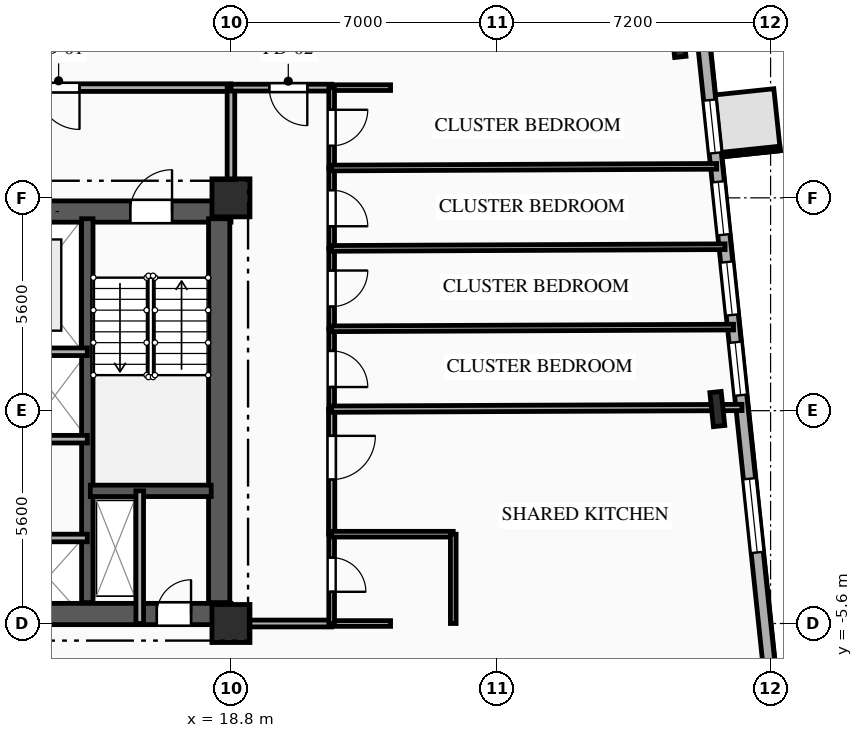
"""IFC4 building model, lengths in metres.
Left out: names, types, materials, properties, quantities, classifications, styles, units other than length and angle.
Written with IfcOpenShell. Run it as: python <this file> out.ifc"""

import sys

from ifc_helpers import new_model, si_unit, direction, frame, frame_2d, origin, origin_2d, place, context, subcontext, project, spatial, rectangle, i_section, extrude, element, fill, save


model = new_model("IFC4")
c1 = context("Model", 3, precision=1e-05, world=origin(), true_north=direction((0.0, 1.0)))
c2 = subcontext(c1, "Body", "Model", "MODEL_VIEW")
j1 = project(units=[si_unit("LENGTHUNIT", "METRE"), si_unit("PLANEANGLEUNIT", "RADIAN")], contexts=[c1])
p1 = place(None, origin())
s1 = spatial("IfcSite", under=j1, at=p1, CompositionType="ELEMENT")
p2 = place(p1, origin())
s2 = spatial("IfcBuilding", under=s1, at=p2, CompositionType="ELEMENT")
p3 = place(p2, frame((0.0, 0.0, 85.7)))
s3 = spatial("IfcBuildingStorey", under=s2, at=p3, CompositionType="ELEMENT", Elevation=85.7)
for number, where, z_axis, x_axis in (
    (1, (18.8, -5.6, 0.0), (0.0, 0.0, 1.0), (1.0, 0.0, 0.0)),
    (2, (18.8, 5.6, 0.0), (0.0, 0.0, 1.0), (1.0, 0.0, 0.0)),
):
    element("IfcColumn", number, at=place(p3, frame(where, z_axis=z_axis, x_axis=x_axis)), inside=s3, PredefinedType="COLUMN", context=c2, shape_type="SweptSolid", body=[
        extrude(rectangle(XDim=1.0, YDim=1.0, at=origin_2d()), origin(), (0.0, 0.0, 1.0), 3.35),
    ])
for number, where, z_axis, x_axis in (
    (3, (31.598, 0.043, 0.0), (0.0, 0.0, 1.0), (0.995, 0.105, 0.0)),
    (4, (30.577, 9.756, 0.0), (0.0, 0.0, 1.0), (0.995, 0.105, 0.0)),
):
    element("IfcColumn", number, at=place(p3, frame(where, z_axis=z_axis, x_axis=x_axis)), inside=s3, PredefinedType="COLUMN", context=c2, shape_type="SweptSolid", body=[
        extrude(i_section(OverallWidth=0.3, OverallDepth=0.9, WebThickness=0.019, FlangeThickness=0.035, FilletRadius=0.03, at=origin_2d()), origin(), (0.0, 0.0, 1.0), 3.35),
    ])
p4 = place(p3, frame((30.135, 20.183, 0.0), z_axis=(0.0, 0.0, 1.0), x_axis=(0.104525716865, -0.994522184023, 0.0)))
e5 = element("IfcWall", 5, at=p4, inside=s3, PredefinedType="SOLIDWALL", context=c2, shape_type="SweptSolid", body=[
    extrude(rectangle(XDim=30.6, YDim=0.32, at=frame_2d((15.3, 0.0))), origin(), (0.0, 0.0, 1.0), 3.045),
])
p5 = place(p4, frame((12.077, 0.0, 0.85)))
e6 = element("IfcOpeningElement", 6, at=p5, cuts=e5, PredefinedType="OPENING", context=c2, shape_type="SweptSolid", body=[
    extrude(rectangle(XDim=1.4, YDim=1.85, at=frame_2d((0.7, 0.925))), frame((0.0, 0.17, 0.0), z_axis=(0.0, -1.0, 0.0), x_axis=(1.0, 0.0, 0.0)), (0.0, 0.0, 1.0), 0.34),
])
p6 = place(p4, frame((14.24, 0.0, 0.85)))
e7 = element("IfcOpeningElement", 7, at=p6, cuts=e5, PredefinedType="OPENING", context=c2, shape_type="SweptSolid", body=[
    extrude(rectangle(XDim=1.4, YDim=1.85, at=frame_2d((0.7, 0.925))), frame((0.0, 0.17, 0.0), z_axis=(0.0, -1.0, 0.0), x_axis=(1.0, 0.0, 0.0)), (0.0, 0.0, 1.0), 0.34),
])
p7 = place(p4, frame((16.362, 0.0, 0.85)))
e8 = element("IfcOpeningElement", 8, at=p7, cuts=e5, PredefinedType="OPENING", context=c2, shape_type="SweptSolid", body=[
    extrude(rectangle(XDim=1.4, YDim=1.85, at=frame_2d((0.7, 0.925))), frame((0.0, 0.17, 0.0), z_axis=(0.0, -1.0, 0.0), x_axis=(1.0, 0.0, 0.0)), (0.0, 0.0, 1.0), 0.34),
])
p8 = place(p4, frame((18.485, 0.0, 0.85)))
e9 = element("IfcOpeningElement", 9, at=p8, cuts=e5, PredefinedType="OPENING", context=c2, shape_type="SweptSolid", body=[
    extrude(rectangle(XDim=1.4, YDim=1.85, at=frame_2d((0.7, 0.925))), frame((0.0, 0.17, 0.0), z_axis=(0.0, -1.0, 0.0), x_axis=(1.0, 0.0, 0.0)), (0.0, 0.0, 1.0), 0.34),
])
p9 = place(p4, frame((22.095, 0.0, 0.85)))
e10 = element("IfcOpeningElement", 10, at=p9, cuts=e5, PredefinedType="OPENING", context=c2, shape_type="SweptSolid", body=[
    extrude(rectangle(XDim=1.95, YDim=1.85, at=frame_2d((0.975, 0.925))), frame((0.0, 0.17, 0.0), z_axis=(0.0, -1.0, 0.0), x_axis=(1.0, 0.0, 0.0)), (0.0, 0.0, 1.0), 0.34),
])
p10 = place(p3, frame((9.2, 5.24, 0.0), z_axis=(0.0, 0.0, 1.0), x_axis=(1.0, 0.0, 0.0)))
e11 = element("IfcWall", 11, at=p10, inside=s3, PredefinedType="SHEAR", context=c2, shape_type="SweptSolid", body=[
    extrude(rectangle(XDim=9.6, YDim=0.56, at=frame_2d((4.8, 0.0))), origin(), (0.0, 0.0, 1.0), 3.045),
])
p11 = place(p10, frame((6.95, 0.0, 0.0)))
e12 = element("IfcOpeningElement", 12, at=p11, cuts=e11, PredefinedType="OPENING", context=c2, shape_type="SweptSolid", body=[
    extrude(rectangle(XDim=1.1, YDim=2.15, at=frame_2d((0.55, 1.075))), frame((0.0, 0.29, 0.0), z_axis=(0.0, -1.0, 0.0), x_axis=(1.0, 0.0, 0.0)), (0.0, 0.0, 1.0), 0.58),
])
p12 = place(p10, frame((3.775, 0.0, 0.0)))
e13 = element("IfcOpeningElement", 13, at=p12, cuts=e11, PredefinedType="OPENING", context=c2, shape_type="SweptSolid", body=[
    extrude(rectangle(XDim=1.05, YDim=2.1, at=frame_2d((0.525, 1.05))), frame((0.0, 0.29, 0.0), z_axis=(0.0, -1.0, 0.0), x_axis=(1.0, 0.0, 0.0)), (0.0, 0.0, 1.0), 0.58),
])
p13 = place(p3, frame((9.2, -5.35, 0.0), z_axis=(0.0, 0.0, 1.0), x_axis=(1.0, 0.0, 0.0)))
e14 = element("IfcWall", 14, at=p13, inside=s3, PredefinedType="SHEAR", context=c2, shape_type="SweptSolid", body=[
    extrude(rectangle(XDim=9.6, YDim=0.56, at=frame_2d((4.8, 0.0))), origin(), (0.0, 0.0, 1.0), 3.045),
])
p14 = place(p13, frame((7.65, 0.0, 0.0)))
e15 = element("IfcOpeningElement", 15, at=p14, cuts=e14, PredefinedType="OPENING", context=c2, shape_type="SweptSolid", body=[
    extrude(rectangle(XDim=0.9, YDim=2.1, at=frame_2d((0.45, 1.05))), frame((0.0, 0.29, 0.0), z_axis=(0.0, -1.0, 0.0), x_axis=(1.0, 0.0, 0.0)), (0.0, 0.0, 1.0), 0.58),
])
p15 = place(p3, frame((18.49, -5.05, 0.0), z_axis=(0.0, 0.0, 1.0), x_axis=(0.0, 1.0, 0.0)))
e16 = element("IfcWall", 16, at=p15, inside=s3, PredefinedType="SHEAR", context=c2, shape_type="SweptSolid", body=[
    extrude(rectangle(XDim=10.1, YDim=0.56, at=frame_2d((5.05, 0.0))), origin(), (0.0, 0.0, 1.0), 3.045),
])
p16 = place(p3, frame((15.02, -5.05, 0.0), z_axis=(0.0, 0.0, 1.0), x_axis=(0.0, 1.0, 0.0)))
e17 = element("IfcWall", 17, at=p16, inside=s3, PredefinedType="SHEAR", context=c2, shape_type="SweptSolid", body=[
    extrude(rectangle(XDim=10.1, YDim=0.3, at=frame_2d((5.05, 0.0))), origin(), (0.0, 0.0, 1.0), 3.045),
])
p17 = place(p3, frame((15.1, -2.11, 0.0), z_axis=(0.0, 0.0, 1.0), x_axis=(1.0, 0.0, 0.0)))
e18 = element("IfcWall", 18, at=p17, inside=s3, PredefinedType="SHEAR", context=c2, shape_type="SweptSolid", body=[
    extrude(rectangle(XDim=3.18, YDim=0.3, at=frame_2d((1.59, 0.0))), origin(), (0.0, 0.0, 1.0), 3.045),
])
p18 = place(p3, frame((16.4, -2.11, 0.0), z_axis=(0.0, 0.0, 1.0), x_axis=(0.0, -1.0, 0.0)))
e19 = element("IfcWall", 19, at=p18, inside=s3, PredefinedType="PARTITIONING", context=c2, shape_type="SweptSolid", body=[
    extrude(rectangle(XDim=3.49, YDim=0.2, at=frame_2d((1.745, 0.0))), origin(), (0.0, 0.0, 1.0), 3.045),
])
p19 = place(p3, frame((18.8, 8.5, 0.0), z_axis=(0.0, 0.0, 1.0), x_axis=(-1.0, 0.0, 0.0)))
e20 = element("IfcWall", 20, at=p19, inside=s3, PredefinedType="PARTITIONING", context=c2, shape_type="SweptSolid", body=[
    extrude(rectangle(XDim=6.8, YDim=0.2, at=frame_2d((3.4, 0.0))), origin(), (0.0, 0.0, 1.0), 3.045),
])
p20 = place(p19, frame((3.985, 0.0, 0.0)))
e21 = element("IfcOpeningElement", 21, at=p20, cuts=e20, PredefinedType="OPENING", context=c2, shape_type="SweptSolid", body=[
    extrude(rectangle(XDim=1.1, YDim=2.15, at=frame_2d((0.55, 1.075))), frame((0.0, 0.11, 0.0), z_axis=(0.0, -1.0, 0.0), x_axis=(1.0, 0.0, 0.0)), (0.0, 0.0, 1.0), 0.22),
])
p21 = place(p3, frame((18.8, 5.6, 0.0), z_axis=(0.0, 0.0, 1.0), x_axis=(0.0, 1.0, 0.0)))
e22 = element("IfcWall", 22, at=p21, inside=s3, PredefinedType="PARTITIONING", context=c2, shape_type="SweptSolid", body=[
    extrude(rectangle(XDim=2.9, YDim=0.2, at=frame_2d((1.45, 0.0))), origin(), (0.0, 0.0, 1.0), 2.53),
])
p22 = place(p3, frame((13.02, -3.35, 0.0), z_axis=(0.0, 0.0, 1.0), x_axis=(1.0, 0.0, 0.0)))
e23 = element("IfcWall", 23, at=p22, inside=s3, PredefinedType="PARTITIONING", context=c2, shape_type="SweptSolid", body=[
    extrude(rectangle(XDim=2.0, YDim=0.2, at=frame_2d((1.0, 0.0))), origin(), (0.0, 0.0, 1.0), 3.045),
])
p23 = place(p3, frame((15.02, -0.75, 0.0), z_axis=(0.0, 0.0, 1.0), x_axis=(-1.0, 0.0, 0.0)))
e24 = element("IfcWall", 24, at=p23, inside=s3, PredefinedType="PARTITIONING", context=c2, shape_type="SweptSolid", body=[
    extrude(rectangle(XDim=1.68, YDim=0.2, at=frame_2d((0.84, 0.0))), origin(), (0.0, 0.0, 1.0), 3.045),
])
p24 = place(p3, frame((21.45, 8.5, 0.0), z_axis=(0.0, 0.0, 1.0), x_axis=(-1.0, 0.0, 0.0)))
e25 = element("IfcWall", 25, at=p24, inside=s3, PredefinedType="PARTITIONING", context=c2, shape_type="SweptSolid", body=[
    extrude(rectangle(XDim=2.65, YDim=0.18, at=frame_2d((1.325, 0.0))), origin(), (0.0, 0.0, 1.0), 3.045),
])
p25 = place(p24, frame((0.641, 0.0, 0.0)))
e26 = element("IfcOpeningElement", 26, at=p25, cuts=e25, PredefinedType="OPENING", context=c2, shape_type="SweptSolid", body=[
    extrude(rectangle(XDim=1.0, YDim=2.15, at=frame_2d((0.5, 1.075))), frame((0.0, 0.1, 0.0), z_axis=(0.0, -1.0, 0.0), x_axis=(1.0, 0.0, 0.0)), (0.0, 0.0, 1.0), 0.2),
])
p26 = place(p3, frame((23.0, 8.5, 0.0), z_axis=(0.0, 0.0, 1.0), x_axis=(-1.0, 0.0, 0.0)))
e27 = element("IfcWall", 27, at=p26, inside=s3, PredefinedType="PARTITIONING", context=c2, shape_type="SweptSolid", body=[
    extrude(rectangle(XDim=1.55, YDim=0.15, at=frame_2d((0.775, 0.0))), origin(), (0.0, 0.0, 1.0), 3.045),
])
p27 = place(p3, frame((18.8, -5.6, 0.0), z_axis=(0.0, 0.0, 1.0), x_axis=(1.0, 0.0, 0.0)))
e28 = element("IfcWall", 28, at=p27, inside=s3, PredefinedType="PARTITIONING", context=c2, shape_type="SweptSolid", body=[
    extrude(rectangle(XDim=2.65, YDim=0.18, at=frame_2d((1.325, 0.0))), origin(), (0.0, 0.0, 1.0), 2.53),
])
p28 = place(p3, frame((21.45, -5.6, 0.0), z_axis=(0.0, 0.0, 1.0), x_axis=(1.0, 0.0, 0.0)))
e29 = element("IfcWall", 29, at=p28, inside=s3, PredefinedType="PLUMBINGWALL", context=c2, shape_type="SweptSolid", body=[
    extrude(rectangle(XDim=1.55, YDim=0.15, at=frame_2d((0.775, 0.0))), origin(), (0.0, 0.0, 1.0), 3.045),
])
p29 = place(p3, frame((21.45, -3.25, 0.0), z_axis=(0.0, 0.0, 1.0), x_axis=(0.0, -1.0, 0.0)))
e30 = element("IfcWall", 30, at=p29, inside=s3, PredefinedType="PLUMBINGWALL", context=c2, shape_type="SweptSolid", body=[
    extrude(rectangle(XDim=2.35, YDim=0.15, at=frame_2d((1.175, 0.0))), origin(), (0.0, 0.0, 1.0), 3.045),
])
p30 = place(p29, frame((0.616, 0.0, 0.0)))
e31 = element("IfcOpeningElement", 31, at=p30, cuts=e30, PredefinedType="OPENING", context=c2, shape_type="SweptSolid", body=[
    extrude(rectangle(XDim=0.9, YDim=2.1, at=frame_2d((0.45, 1.05))), frame((0.0, 0.085, 0.0), z_axis=(0.0, -1.0, 0.0), x_axis=(1.0, 0.0, 0.0)), (0.0, 0.0, 1.0), 0.17),
])
p31 = place(p3, frame((21.45, 0.04, 0.0), z_axis=(0.0, 0.0, 1.0), x_axis=(0.0, -1.0, 0.0)))
e32 = element("IfcWall", 32, at=p31, inside=s3, PredefinedType="PARTITIONING", context=c2, shape_type="SweptSolid", body=[
    extrude(rectangle(XDim=3.29, YDim=0.165, at=frame_2d((1.645, 0.0))), origin(), (0.0, 0.0, 1.0), 3.045),
])
p32 = place(p31, frame((0.702, 0.0, 0.0)))
e33 = element("IfcOpeningElement", 33, at=p32, cuts=e32, PredefinedType="OPENING", context=c2, shape_type="SweptSolid", body=[
    extrude(rectangle(XDim=1.15, YDim=2.15, at=frame_2d((0.575, 1.075))), frame((0.0, 0.093, 0.0), z_axis=(0.0, -1.0, 0.0), x_axis=(1.0, 0.0, 0.0)), (0.0, 0.0, 1.0), 0.185),
])
p33 = place(p3, frame((21.45, 2.155, 0.0), z_axis=(0.0, 0.0, 1.0), x_axis=(0.0, -1.0, 0.0)))
e34 = element("IfcWall", 34, at=p33, inside=s3, PredefinedType="PARTITIONING", context=c2, shape_type="SweptSolid", body=[
    extrude(rectangle(XDim=2.115, YDim=0.15, at=frame_2d((1.058, 0.0))), origin(), (0.0, 0.0, 1.0), 3.045),
])
p34 = place(p33, frame((0.583, 0.0, 0.0)))
e35 = element("IfcOpeningElement", 35, at=p34, cuts=e34, PredefinedType="OPENING", context=c2, shape_type="SweptSolid", body=[
    extrude(rectangle(XDim=0.95, YDim=2.1, at=frame_2d((0.475, 1.05))), frame((0.0, 0.085, 0.0), z_axis=(0.0, -1.0, 0.0), x_axis=(1.0, 0.0, 0.0)), (0.0, 0.0, 1.0), 0.17),
])
p35 = place(p3, frame((21.45, 4.27, 0.0), z_axis=(0.0, 0.0, 1.0), x_axis=(0.0, -1.0, 0.0)))
e36 = element("IfcWall", 36, at=p35, inside=s3, PredefinedType="PARTITIONING", context=c2, shape_type="SweptSolid", body=[
    extrude(rectangle(XDim=2.115, YDim=0.15, at=frame_2d((1.058, 0.0))), origin(), (0.0, 0.0, 1.0), 3.045),
])
p36 = place(p35, frame((0.583, 0.0, 0.0)))
e37 = element("IfcOpeningElement", 37, at=p36, cuts=e36, PredefinedType="OPENING", context=c2, shape_type="SweptSolid", body=[
    extrude(rectangle(XDim=0.95, YDim=2.1, at=frame_2d((0.475, 1.05))), frame((0.0, 0.085, 0.0), z_axis=(0.0, -1.0, 0.0), x_axis=(1.0, 0.0, 0.0)), (0.0, 0.0, 1.0), 0.17),
])
p37 = place(p3, frame((21.45, 6.385, 0.0), z_axis=(0.0, 0.0, 1.0), x_axis=(0.0, -1.0, 0.0)))
e38 = element("IfcWall", 38, at=p37, inside=s3, PredefinedType="PARTITIONING", context=c2, shape_type="SweptSolid", body=[
    extrude(rectangle(XDim=2.115, YDim=0.15, at=frame_2d((1.058, 0.0))), origin(), (0.0, 0.0, 1.0), 3.045),
])
p38 = place(p37, frame((0.583, 0.0, 0.0)))
e39 = element("IfcOpeningElement", 39, at=p38, cuts=e38, PredefinedType="OPENING", context=c2, shape_type="SweptSolid", body=[
    extrude(rectangle(XDim=0.95, YDim=2.1, at=frame_2d((0.475, 1.05))), frame((0.0, 0.085, 0.0), z_axis=(0.0, -1.0, 0.0), x_axis=(1.0, 0.0, 0.0)), (0.0, 0.0, 1.0), 0.17),
])
p39 = place(p3, frame((21.45, 8.5, 0.0), z_axis=(0.0, 0.0, 1.0), x_axis=(0.0, -1.0, 0.0)))
e40 = element("IfcWall", 40, at=p39, inside=s3, PredefinedType="PARTITIONING", context=c2, shape_type="SweptSolid", body=[
    extrude(rectangle(XDim=2.115, YDim=0.15, at=frame_2d((1.058, 0.0))), origin(), (0.0, 0.0, 1.0), 3.045),
])
p40 = place(p39, frame((0.583, 0.0, 0.0)))
e41 = element("IfcOpeningElement", 41, at=p40, cuts=e40, PredefinedType="OPENING", context=c2, shape_type="SweptSolid", body=[
    extrude(rectangle(XDim=0.95, YDim=2.1, at=frame_2d((0.475, 1.05))), frame((0.0, 0.085, 0.0), z_axis=(0.0, -1.0, 0.0), x_axis=(1.0, 0.0, 0.0)), (0.0, 0.0, 1.0), 0.17),
])
p41 = place(p3, frame((21.45, -3.25, 0.0), z_axis=(0.0, 0.0, 1.0), x_axis=(1.0, 0.0, 0.0)))
e42 = element("IfcWall", 42, at=p41, inside=s3, PredefinedType="PLUMBINGWALL", context=c2, shape_type="SweptSolid", body=[
    extrude(rectangle(XDim=3.2, YDim=0.15, at=frame_2d((1.6, 0.0))), origin(), (0.0, 0.0, 1.0), 3.045),
])
p42 = place(p3, frame((24.65, -3.25, 0.0), z_axis=(0.0, 0.0, 1.0), x_axis=(0.0, -1.0, 0.0)))
e43 = element("IfcWall", 43, at=p42, inside=s3, PredefinedType="PLUMBINGWALL", context=c2, shape_type="SweptSolid", body=[
    extrude(rectangle(XDim=2.35, YDim=0.15, at=frame_2d((1.175, 0.0))), origin(), (0.0, 0.0, 1.0), 3.045),
])
p43 = place(p3, frame((21.45, 0.04, 0.0), z_axis=(0.0, 0.0, 1.0), x_axis=(0.999991717636, 0.004069970361, 0.0)))
e44 = element("IfcWall", 44, at=p43, inside=s3, PredefinedType="PARTITIONING", context=c2, shape_type="SweptSolid", body=[
    extrude(rectangle(XDim=10.797, YDim=0.165, at=frame_2d((5.399, 0.0))), origin(), (0.0, 0.0, 1.0), 2.53),
])
p44 = place(p3, frame((21.45, 2.155, 0.0), z_axis=(0.0, 0.0, 1.0), x_axis=(0.999991365588, 0.004155568413, 0.0)))
e45 = element("IfcWall", 45, at=p44, inside=s3, PredefinedType="PARTITIONING", context=c2, shape_type="SweptSolid", body=[
    extrude(rectangle(XDim=10.575, YDim=0.15, at=frame_2d((5.288, 0.0))), origin(), (0.0, 0.0, 1.0), 3.045),
])
p45 = place(p3, frame((21.45, 4.27, 0.0), z_axis=(0.0, 0.0, 1.0), x_axis=(0.999990991033, 0.004244744214, 0.0)))
e46 = element("IfcWall", 46, at=p45, inside=s3, PredefinedType="PARTITIONING", context=c2, shape_type="SweptSolid", body=[
    extrude(rectangle(XDim=10.353, YDim=0.15, at=frame_2d((5.176, 0.0))), origin(), (0.0, 0.0, 1.0), 3.045),
])
p46 = place(p3, frame((21.45, 6.385, 0.0), z_axis=(0.0, 0.0, 1.0), x_axis=(0.999990591112, 0.004337935759, 0.0)))
e47 = element("IfcWall", 47, at=p46, inside=s3, PredefinedType="PARTITIONING", context=c2, shape_type="SweptSolid", body=[
    extrude(rectangle(XDim=10.13, YDim=0.15, at=frame_2d((5.065, 0.0))), origin(), (0.0, 0.0, 1.0), 3.045),
])
p47 = place(p3, frame((9.2, 1.55, 0.0), z_axis=(0.0, 0.0, 1.0), x_axis=(1.0, 0.0, 0.0)))
e48 = element("IfcWall", 48, at=p47, inside=s3, PredefinedType="PARTITIONING", context=c2, shape_type="SweptSolid", body=[
    extrude(rectangle(XDim=5.82, YDim=0.2, at=frame_2d((2.91, 0.0))), origin(), (0.0, 0.0, 1.0), 3.045),
])
p48 = place(p5, origin())
e49 = element("IfcWindow", 49, at=p48, inside=s3, PartitioningType="SINGLE_PANEL", PredefinedType="WINDOW", context=c2, shape_type="SweptSolid", body=[
    extrude(rectangle(XDim=1.4, YDim=1.85, at=frame_2d((0.7, 0.925))), frame((0.0, 0.03, 0.0), z_axis=(0.0, -1.0, 0.0), x_axis=(1.0, 0.0, 0.0)), (0.0, 0.0, 1.0), 0.06),
])
fill(e6, e49)
p49 = place(p6, origin())
e50 = element("IfcWindow", 50, at=p49, inside=s3, PartitioningType="SINGLE_PANEL", PredefinedType="WINDOW", context=c2, shape_type="SweptSolid", body=[
    extrude(rectangle(XDim=1.4, YDim=1.85, at=frame_2d((0.7, 0.925))), frame((0.0, 0.03, 0.0), z_axis=(0.0, -1.0, 0.0), x_axis=(1.0, 0.0, 0.0)), (0.0, 0.0, 1.0), 0.06),
])
fill(e7, e50)
p50 = place(p7, origin())
e51 = element("IfcWindow", 51, at=p50, inside=s3, PartitioningType="SINGLE_PANEL", PredefinedType="WINDOW", context=c2, shape_type="SweptSolid", body=[
    extrude(rectangle(XDim=1.4, YDim=1.85, at=frame_2d((0.7, 0.925))), frame((0.0, 0.03, 0.0), z_axis=(0.0, -1.0, 0.0), x_axis=(1.0, 0.0, 0.0)), (0.0, 0.0, 1.0), 0.06),
])
fill(e8, e51)
p51 = place(p8, origin())
e52 = element("IfcWindow", 52, at=p51, inside=s3, PartitioningType="SINGLE_PANEL", PredefinedType="WINDOW", context=c2, shape_type="SweptSolid", body=[
    extrude(rectangle(XDim=1.4, YDim=1.85, at=frame_2d((0.7, 0.925))), frame((0.0, 0.03, 0.0), z_axis=(0.0, -1.0, 0.0), x_axis=(1.0, 0.0, 0.0)), (0.0, 0.0, 1.0), 0.06),
])
fill(e9, e52)
p52 = place(p9, origin())
e53 = element("IfcWindow", 53, at=p52, inside=s3, PartitioningType="SINGLE_PANEL", PredefinedType="WINDOW", context=c2, shape_type="SweptSolid", body=[
    extrude(rectangle(XDim=1.95, YDim=1.85, at=frame_2d((0.975, 0.925))), frame((0.0, 0.03, 0.0), z_axis=(0.0, -1.0, 0.0), x_axis=(1.0, 0.0, 0.0)), (0.0, 0.0, 1.0), 0.06),
])
fill(e10, e53)
p53 = place(p11, origin())
e54 = element("IfcDoor", 54, at=p53, inside=s3, OperationType="SINGLE_SWING_RIGHT", PredefinedType="DOOR", context=c2, shape_type="SweptSolid", body=[
    extrude(rectangle(XDim=1.1, YDim=2.15, at=frame_2d((0.55, 1.075))), frame((0.0, 0.025, 0.0), z_axis=(0.0, -1.0, 0.0), x_axis=(1.0, 0.0, 0.0)), (0.0, 0.0, 1.0), 0.05),
])
fill(e12, e54)
p54 = place(p14, origin())
e55 = element("IfcDoor", 55, at=p54, inside=s3, OperationType="SINGLE_SWING_RIGHT", PredefinedType="DOOR", context=c2, shape_type="SweptSolid", body=[
    extrude(rectangle(XDim=0.9, YDim=2.1, at=frame_2d((0.45, 1.05))), frame((0.0, 0.025, 0.0), z_axis=(0.0, -1.0, 0.0), x_axis=(1.0, 0.0, 0.0)), (0.0, 0.0, 1.0), 0.05),
])
fill(e15, e55)
p55 = place(p20, origin())
e56 = element("IfcDoor", 56, at=p55, inside=s3, OperationType="SINGLE_SWING_LEFT", PredefinedType="DOOR", context=c2, shape_type="SweptSolid", body=[
    extrude(rectangle(XDim=1.1, YDim=2.15, at=frame_2d((0.55, 1.075))), frame((0.0, 0.025, 0.0), z_axis=(0.0, -1.0, 0.0), x_axis=(1.0, 0.0, 0.0)), (0.0, 0.0, 1.0), 0.05),
])
fill(e21, e56)
p56 = place(p25, origin())
e57 = element("IfcDoor", 57, at=p56, inside=s3, OperationType="SINGLE_SWING_LEFT", PredefinedType="DOOR", context=c2, shape_type="SweptSolid", body=[
    extrude(rectangle(XDim=1.0, YDim=2.15, at=frame_2d((0.5, 1.075))), frame((0.0, 0.025, 0.0), z_axis=(0.0, -1.0, 0.0), x_axis=(1.0, 0.0, 0.0)), (0.0, 0.0, 1.0), 0.05),
])
fill(e26, e57)
p57 = place(p30, origin())
e58 = element("IfcDoor", 58, at=p57, inside=s3, OperationType="SINGLE_SWING_RIGHT", PredefinedType="DOOR", context=c2, shape_type="SweptSolid", body=[
    extrude(rectangle(XDim=0.9, YDim=2.1, at=frame_2d((0.45, 1.05))), frame((0.0, 0.025, 0.0), z_axis=(0.0, -1.0, 0.0), x_axis=(1.0, 0.0, 0.0)), (0.0, 0.0, 1.0), 0.05),
])
fill(e31, e58)
p58 = place(p32, origin())
e59 = element("IfcDoor", 59, at=p58, inside=s3, OperationType="SINGLE_SWING_LEFT", PredefinedType="DOOR", context=c2, shape_type="SweptSolid", body=[
    extrude(rectangle(XDim=1.15, YDim=2.15, at=frame_2d((0.575, 1.075))), frame((0.0, 0.025, 0.0), z_axis=(0.0, -1.0, 0.0), x_axis=(1.0, 0.0, 0.0)), (0.0, 0.0, 1.0), 0.05),
])
fill(e33, e59)
p59 = place(p34, origin())
e60 = element("IfcDoor", 60, at=p59, inside=s3, OperationType="SINGLE_SWING_RIGHT", PredefinedType="DOOR", context=c2, shape_type="SweptSolid", body=[
    extrude(rectangle(XDim=0.95, YDim=2.1, at=frame_2d((0.475, 1.05))), frame((0.0, 0.025, 0.0), z_axis=(0.0, -1.0, 0.0), x_axis=(1.0, 0.0, 0.0)), (0.0, 0.0, 1.0), 0.05),
])
fill(e35, e60)
p60 = place(p36, origin())
e61 = element("IfcDoor", 61, at=p60, inside=s3, OperationType="SINGLE_SWING_LEFT", PredefinedType="DOOR", context=c2, shape_type="SweptSolid", body=[
    extrude(rectangle(XDim=0.95, YDim=2.1, at=frame_2d((0.475, 1.05))), frame((0.0, 0.025, 0.0), z_axis=(0.0, -1.0, 0.0), x_axis=(1.0, 0.0, 0.0)), (0.0, 0.0, 1.0), 0.05),
])
fill(e37, e61)
p61 = place(p38, origin())
e62 = element("IfcDoor", 62, at=p61, inside=s3, OperationType="SINGLE_SWING_RIGHT", PredefinedType="DOOR", context=c2, shape_type="SweptSolid", body=[
    extrude(rectangle(XDim=0.95, YDim=2.1, at=frame_2d((0.475, 1.05))), frame((0.0, 0.025, 0.0), z_axis=(0.0, -1.0, 0.0), x_axis=(1.0, 0.0, 0.0)), (0.0, 0.0, 1.0), 0.05),
])
fill(e39, e62)
p62 = place(p40, origin())
e63 = element("IfcDoor", 63, at=p62, inside=s3, OperationType="SINGLE_SWING_LEFT", PredefinedType="DOOR", context=c2, shape_type="SweptSolid", body=[
    extrude(rectangle(XDim=0.95, YDim=2.1, at=frame_2d((0.475, 1.05))), frame((0.0, 0.025, 0.0), z_axis=(0.0, -1.0, 0.0), x_axis=(1.0, 0.0, 0.0)), (0.0, 0.0, 1.0), 0.05),
])
fill(e41, e63)
save(model, sys.argv[1])
